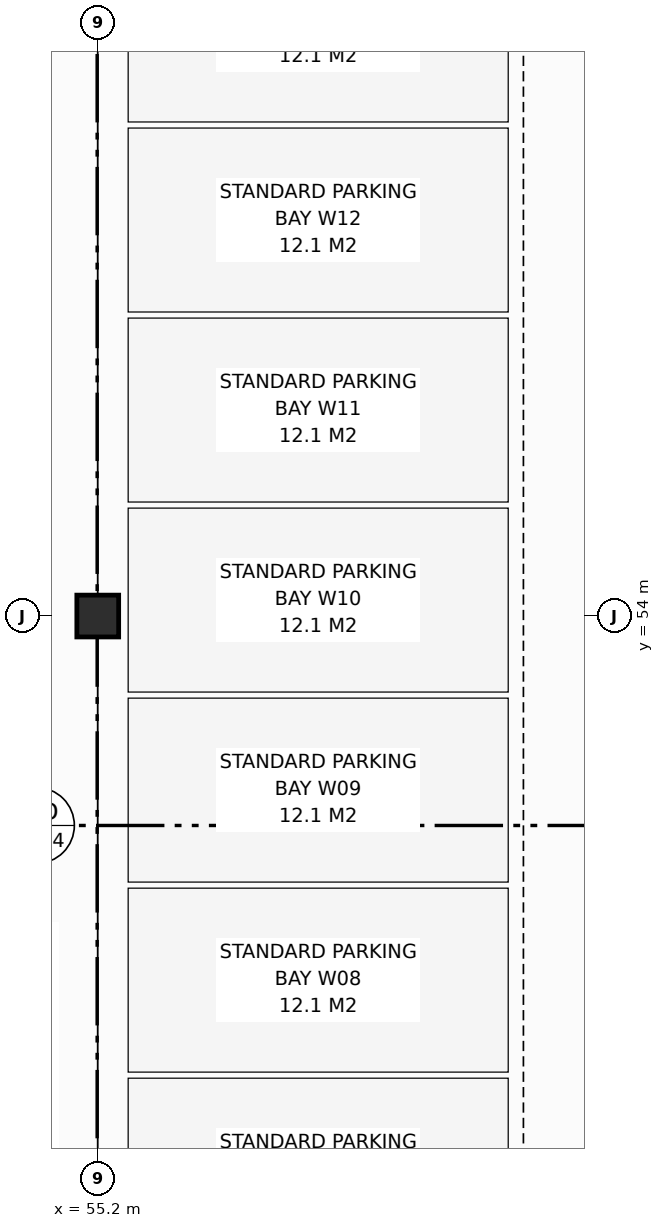
"""IFC4 building model, lengths in metres.
Left out: names, types, materials, properties, quantities, classifications, styles, units other than length and angle.
Written with IfcOpenShell. Run it as: python <this file> out.ifc"""

import sys

from ifc_helpers import new_model, si_unit, direction, frame, origin, origin_2d, place, context, subcontext, project, spatial, rectangle, extrude, element, save


model = new_model("IFC4")
c1 = context("Model", 3, precision=1e-05, world=origin(), true_north=direction((0.0, 1.0)))
c2 = subcontext(c1, "Body", "Model", "MODEL_VIEW")
j1 = project(units=[si_unit("LENGTHUNIT", "METRE"), si_unit("PLANEANGLEUNIT", "RADIAN")], contexts=[c1])
p1 = place(None, origin())
s1 = spatial("IfcSite", under=j1, at=p1, CompositionType="ELEMENT")
p2 = place(p1, origin())
s2 = spatial("IfcBuilding", under=s1, at=p2, CompositionType="ELEMENT")
p3 = place(p2, frame((0.0, 0.0, -3.8)))
s3 = spatial("IfcBuildingStorey", under=s2, at=p3, CompositionType="ELEMENT", Elevation=-3.8)
p4 = place(p3, frame((55.2, 54.0, 0.0), z_axis=(0.0, 0.0, 1.0), x_axis=(1.0, 0.0, 0.0)))
e1 = element("IfcColumn", 1, at=p4, inside=s3, PredefinedType="COLUMN", context=c2, shape_type="SweptSolid", body=[
    extrude(rectangle(XDim=0.55, YDim=0.55, at=origin_2d()), origin(), (0.0, 0.0, 1.0), 3.8),
])
save(model, sys.argv[1])
